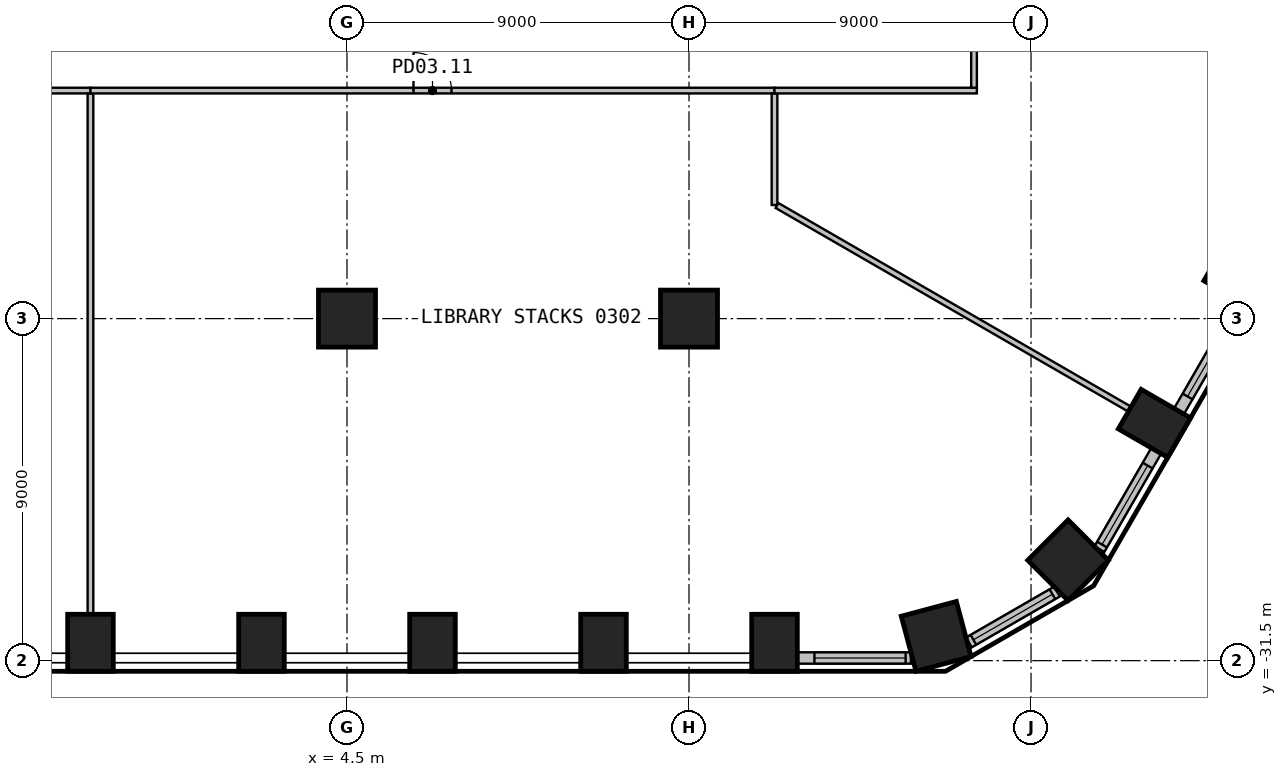
"""IFC4 building model, lengths in metres.
Left out: names, types, materials, properties, quantities, classifications, styles, units other than length and angle.
Written with IfcOpenShell. Run it as: python <this file> out.ifc"""

import sys

from ifc_helpers import new_model, si_unit, direction, frame, frame_2d, origin, origin_2d, place, context, subcontext, project, spatial, rectangle, circle, extrude, element, fill, save


model = new_model("IFC4")
c1 = context("Model", 3, precision=1e-05, world=origin(), true_north=direction((0.0, 1.0)))
c2 = subcontext(c1, "Body", "Model", "MODEL_VIEW")
j1 = project(units=[si_unit("LENGTHUNIT", "METRE"), si_unit("PLANEANGLEUNIT", "RADIAN")], contexts=[c1])
p1 = place(None, origin())
s1 = spatial("IfcSite", under=j1, at=p1, CompositionType="ELEMENT")
p2 = place(p1, origin())
s2 = spatial("IfcBuilding", under=s1, at=p2, CompositionType="ELEMENT")
p3 = place(p2, frame((0.0, 0.0, 15.6)))
s3 = spatial("IfcBuildingStorey", under=s2, at=p3, CompositionType="ELEMENT", Elevation=15.6)
for number, where, z_axis, x_axis in (
    (1, (-2.25, -31.03, 0.0), (0.0, 0.0, 1.0), (1.0, 0.0, 0.0)),
    (2, (2.25, -31.03, 0.0), (0.0, 0.0, 1.0), (1.0, 0.0, 0.0)),
    (3, (6.75, -31.03, 0.0), (0.0, 0.0, 1.0), (1.0, 0.0, 0.0)),
    (4, (11.25, -31.03, 0.0), (0.0, 0.0, 1.0), (1.0, 0.0, 0.0)),
    (5, (15.75, -31.03, 0.0), (0.0, 0.0, 1.0), (1.0, 0.0, 0.0)),
):
    element("IfcColumn", number, at=place(p3, frame(where, z_axis=z_axis, x_axis=x_axis)), inside=s3, PredefinedType="COLUMN", context=c2, shape_type="SweptSolid", body=[
        extrude(rectangle(XDim=1.2, YDim=1.5, at=origin_2d()), origin(), (0.0, 0.0, 1.0), 4.4),
    ])
for number, where, z_axis, x_axis in (
    (6, (20.004, -30.861, 0.0), (0.0, 0.0, 1.0), (0.966, 0.259, 0.0)),
    (7, (23.475, -28.857, 0.0), (0.0, 0.0, 1.0), (0.707, 0.707, 0.0)),
):
    element("IfcColumn", number, at=place(p3, frame(where, z_axis=z_axis, x_axis=x_axis)), inside=s3, PredefinedType="COLUMN", context=c2, shape_type="SweptSolid", body=[
        extrude(rectangle(XDim=1.5, YDim=1.5, at=origin_2d()), origin(), (0.0, 0.0, 1.0), 4.4),
    ])
for number, where, z_axis, x_axis in (
    (8, (25.748, -25.258, 0.0), (0.0, 0.0, 1.0), (0.5, 0.866, 0.0)),
    (9, (27.998, -21.361, 0.0), (0.0, 0.0, 1.0), (0.5, 0.866, 0.0)),
):
    element("IfcColumn", number, at=place(p3, frame(where, z_axis=z_axis, x_axis=x_axis)), inside=s3, PredefinedType="COLUMN", context=c2, shape_type="SweptSolid", body=[
        extrude(rectangle(XDim=1.2, YDim=1.5, at=origin_2d()), origin(), (0.0, 0.0, 1.0), 4.4),
    ])
for number, where, z_axis, x_axis in (
    (10, (4.5, -22.5, 0.0), (0.0, 0.0, 1.0), (1.0, 0.0, 0.0)),
    (11, (13.5, -22.5, 0.0), (0.0, 0.0, 1.0), (1.0, 0.0, 0.0)),
):
    element("IfcColumn", number, at=place(p3, frame(where, z_axis=z_axis, x_axis=x_axis)), inside=s3, PredefinedType="COLUMN", context=c2, shape_type="SweptSolid", body=[
        extrude(circle(Radius=0.75, at=origin_2d()), origin(), (0.0, 0.0, 1.0), 4.4),
    ])
p4 = place(p3, frame((16.351, -31.43, 0.0), z_axis=(0.0, 0.0, 1.0), x_axis=(1.0, 0.0, 0.0)))
e12 = element("IfcWall", 12, at=p4, inside=s3, PredefinedType="SOLIDWALL", context=c2, shape_type="SweptSolid", body=[
    extrude(rectangle(XDim=2.989, YDim=0.3, at=frame_2d((1.494, 0.0))), origin(), (0.0, 0.0, 1.0), 4.4),
])
p5 = place(p4, frame((0.449, 0.0, 0.9)))
e13 = element("IfcOpeningElement", 13, at=p5, cuts=e12, PredefinedType="OPENING", context=c2, shape_type="SweptSolid", body=[
    extrude(rectangle(XDim=2.4, YDim=3.0, at=frame_2d((1.2, 1.5))), frame((0.0, 0.16, 0.0), z_axis=(0.0, -1.0, 0.0), x_axis=(1.0, 0.0, 0.0)), (0.0, 0.0, 1.0), 0.32),
])
p6 = place(p3, frame((20.864, -31.021, 0.0), z_axis=(0.0, 0.0, 1.0), x_axis=(0.866001915448, 0.500040680786, 0.0)))
e14 = element("IfcWall", 14, at=p6, inside=s3, PredefinedType="SOLIDWALL", context=c2, shape_type="SweptSolid", body=[
    extrude(rectangle(XDim=2.678, YDim=0.3, at=frame_2d((1.339, 0.0))), origin(), (0.0, 0.0, 1.0), 4.4),
])
p7 = place(p6, frame((0.139, 0.0, 0.9)))
e15 = element("IfcOpeningElement", 15, at=p7, cuts=e14, PredefinedType="OPENING", context=c2, shape_type="SweptSolid", body=[
    extrude(rectangle(XDim=2.4, YDim=3.0, at=frame_2d((1.2, 1.5))), frame((0.0, 0.16, 0.0), z_axis=(0.0, -1.0, 0.0), x_axis=(1.0, 0.0, 0.0)), (0.0, 0.0, 1.0), 0.32),
])
p8 = place(p3, frame((24.299, -28.566, 0.0), z_axis=(0.0, 0.0, 1.0), x_axis=(0.49999586137, 0.866027793211, 0.0)))
e16 = element("IfcWall", 16, at=p8, inside=s3, PredefinedType="SOLIDWALL", context=c2, shape_type="SweptSolid", body=[
    extrude(rectangle(XDim=2.989, YDim=0.3, at=frame_2d((1.494, 0.0))), origin(), (0.0, 0.0, 1.0), 4.4),
])
p9 = place(p8, frame((0.139, 0.0, 0.9)))
e17 = element("IfcOpeningElement", 17, at=p9, cuts=e16, PredefinedType="OPENING", context=c2, shape_type="SweptSolid", body=[
    extrude(rectangle(XDim=2.4, YDim=3.0, at=frame_2d((1.2, 1.5))), frame((0.0, 0.16, 0.0), z_axis=(0.0, -1.0, 0.0), x_axis=(1.0, 0.0, 0.0)), (0.0, 0.0, 1.0), 0.32),
])
p10 = place(p3, frame((26.394, -24.938, 0.0), z_axis=(0.0, 0.0, 1.0), x_axis=(0.499991515992, 0.866030301974, 0.0)))
e18 = element("IfcWall", 18, at=p10, inside=s3, PredefinedType="SOLIDWALL", context=c2, shape_type="SweptSolid", body=[
    extrude(rectangle(XDim=3.299, YDim=0.3, at=frame_2d((1.649, 0.0))), origin(), (0.0, 0.0, 1.0), 4.4),
])
p11 = place(p10, frame((0.449, 0.0, 0.9)))
e19 = element("IfcOpeningElement", 19, at=p11, cuts=e18, PredefinedType="OPENING", context=c2, shape_type="SweptSolid", body=[
    extrude(rectangle(XDim=2.4, YDim=3.0, at=frame_2d((1.2, 1.5))), frame((0.0, 0.16, 0.0), z_axis=(0.0, -1.0, 0.0), x_axis=(1.0, 0.0, 0.0)), (0.0, 0.0, 1.0), 0.32),
])
p12 = place(p3, frame((-16.156, -16.5, 0.0), z_axis=(0.0, 0.0, 1.0), x_axis=(1.0, 0.0, 0.0)))
e20 = element("IfcWall", 20, at=p12, inside=s3, PredefinedType="PARTITIONING", context=c2, shape_type="SweptSolid", body=[
    extrude(rectangle(XDim=13.906, YDim=0.15, at=frame_2d((6.953, 0.0))), origin(), (0.0, 0.0, 1.0), 4.4),
])
p13 = place(p12, frame((6.453, 0.0, 0.0)))
e21 = element("IfcOpeningElement", 21, at=p13, cuts=e20, PredefinedType="OPENING", context=c2, shape_type="SweptSolid", body=[
    extrude(rectangle(XDim=1.0, YDim=2.1, at=frame_2d((0.5, 1.05))), frame((0.0, 0.085, 0.0), z_axis=(0.0, -1.0, 0.0), x_axis=(1.0, 0.0, 0.0)), (0.0, 0.0, 1.0), 0.17),
])
p14 = place(p3, frame((-2.25, -16.575, 0.0), z_axis=(0.0, 0.0, 1.0), x_axis=(0.0, -1.0, 0.0)))
e22 = element("IfcWall", 22, at=p14, inside=s3, PredefinedType="PARTITIONING", context=c2, shape_type="SweptSolid", body=[
    extrude(rectangle(XDim=13.685, YDim=0.15, at=frame_2d((6.842, 0.0))), origin(), (0.0, 0.0, 1.0), 4.4),
])
p15 = place(p3, frame((-2.25, -16.5, 0.0), z_axis=(0.0, 0.0, 1.0), x_axis=(1.0, 0.0, 0.0)))
e23 = element("IfcWall", 23, at=p15, inside=s3, PredefinedType="PARTITIONING", context=c2, shape_type="SweptSolid", body=[
    extrude(rectangle(XDim=18.0, YDim=0.15, at=frame_2d((9.0, 0.0))), origin(), (0.0, 0.0, 1.0), 4.4),
])
p16 = place(p15, frame((8.5, 0.0, 0.0)))
e24 = element("IfcOpeningElement", 24, at=p16, cuts=e23, PredefinedType="OPENING", context=c2, shape_type="SweptSolid", body=[
    extrude(rectangle(XDim=1.0, YDim=2.1, at=frame_2d((0.5, 1.05))), frame((0.0, 0.085, 0.0), z_axis=(0.0, -1.0, 0.0), x_axis=(1.0, 0.0, 0.0)), (0.0, 0.0, 1.0), 0.17),
])
p17 = place(p3, frame((15.75, -16.575, 0.0), z_axis=(0.0, 0.0, 1.0), x_axis=(0.0, -1.0, 0.0)))
e25 = element("IfcWall", 25, at=p17, inside=s3, PredefinedType="PARTITIONING", context=c2, shape_type="SweptSolid", body=[
    extrude(rectangle(XDim=2.936, YDim=0.15, at=frame_2d((1.468, 0.0))), origin(), (0.0, 0.0, 1.0), 4.4),
])
p18 = place(p3, frame((15.815, -19.523, 0.0), z_axis=(0.0, 0.0, 1.0), x_axis=(0.866021425885, -0.500006889861, 0.0)))
e26 = element("IfcWall", 26, at=p18, inside=s3, PredefinedType="PARTITIONING", context=c2, shape_type="SweptSolid", body=[
    extrude(rectangle(XDim=10.699, YDim=0.15, at=frame_2d((5.35, 0.0))), origin(), (0.0, 0.0, 1.0), 4.4),
])
p19 = place(p3, frame((15.75, -16.5, 0.0), z_axis=(0.0, 0.0, 1.0), x_axis=(1.0, 0.0, 0.0)))
e27 = element("IfcWall", 27, at=p19, inside=s3, PredefinedType="PARTITIONING", context=c2, shape_type="SweptSolid", body=[
    extrude(rectangle(XDim=5.325, YDim=0.15, at=frame_2d((2.663, 0.0))), origin(), (0.0, 0.0, 1.0), 4.4),
])
p20 = place(p3, frame((21.0, -16.425, 0.0), z_axis=(0.0, 0.0, 1.0), x_axis=(0.0, 1.0, 0.0)))
e28 = element("IfcWall", 28, at=p20, inside=s3, PredefinedType="PARTITIONING", context=c2, shape_type="SweptSolid", body=[
    extrude(rectangle(XDim=14.25, YDim=0.15, at=frame_2d((7.125, 0.0))), origin(), (0.0, 0.0, 1.0), 4.4),
])
p21 = place(p20, frame((6.625, 0.0, 0.0)))
e29 = element("IfcOpeningElement", 29, at=p21, cuts=e28, PredefinedType="OPENING", context=c2, shape_type="SweptSolid", body=[
    extrude(rectangle(XDim=1.0, YDim=2.1, at=frame_2d((0.5, 1.05))), frame((0.0, 0.085, 0.0), z_axis=(0.0, -1.0, 0.0), x_axis=(1.0, 0.0, 0.0)), (0.0, 0.0, 1.0), 0.17),
])
p22 = place(p5, origin())
e30 = element("IfcWindow", 30, at=p22, inside=s3, PartitioningType="SINGLE_PANEL", PredefinedType="WINDOW", context=c2, shape_type="SweptSolid", body=[
    extrude(rectangle(XDim=2.4, YDim=3.0, at=frame_2d((1.2, 1.5))), frame((0.0, 0.03, 0.0), z_axis=(0.0, -1.0, 0.0), x_axis=(1.0, 0.0, 0.0)), (0.0, 0.0, 1.0), 0.06),
])
fill(e13, e30)
p23 = place(p7, origin())
e31 = element("IfcWindow", 31, at=p23, inside=s3, PartitioningType="SINGLE_PANEL", PredefinedType="WINDOW", context=c2, shape_type="SweptSolid", body=[
    extrude(rectangle(XDim=2.4, YDim=3.0, at=frame_2d((1.2, 1.5))), frame((0.0, 0.03, 0.0), z_axis=(0.0, -1.0, 0.0), x_axis=(1.0, 0.0, 0.0)), (0.0, 0.0, 1.0), 0.06),
])
fill(e15, e31)
p24 = place(p9, origin())
e32 = element("IfcWindow", 32, at=p24, inside=s3, PartitioningType="SINGLE_PANEL", PredefinedType="WINDOW", context=c2, shape_type="SweptSolid", body=[
    extrude(rectangle(XDim=2.4, YDim=3.0, at=frame_2d((1.2, 1.5))), frame((0.0, 0.03, 0.0), z_axis=(0.0, -1.0, 0.0), x_axis=(1.0, 0.0, 0.0)), (0.0, 0.0, 1.0), 0.06),
])
fill(e17, e32)
p25 = place(p11, origin())
e33 = element("IfcWindow", 33, at=p25, inside=s3, PartitioningType="SINGLE_PANEL", PredefinedType="WINDOW", context=c2, shape_type="SweptSolid", body=[
    extrude(rectangle(XDim=2.4, YDim=3.0, at=frame_2d((1.2, 1.5))), frame((0.0, 0.03, 0.0), z_axis=(0.0, -1.0, 0.0), x_axis=(1.0, 0.0, 0.0)), (0.0, 0.0, 1.0), 0.06),
])
fill(e19, e33)
p26 = place(p16, origin())
e34 = element("IfcDoor", 34, at=p26, inside=s3, OperationType="SINGLE_SWING_RIGHT", PredefinedType="DOOR", context=c2, shape_type="SweptSolid", body=[
    extrude(rectangle(XDim=1.0, YDim=2.1, at=frame_2d((0.5, 1.05))), frame((0.0, 0.025, 0.0), z_axis=(0.0, -1.0, 0.0), x_axis=(1.0, 0.0, 0.0)), (0.0, 0.0, 1.0), 0.05),
])
fill(e24, e34)
save(model, sys.argv[1])
